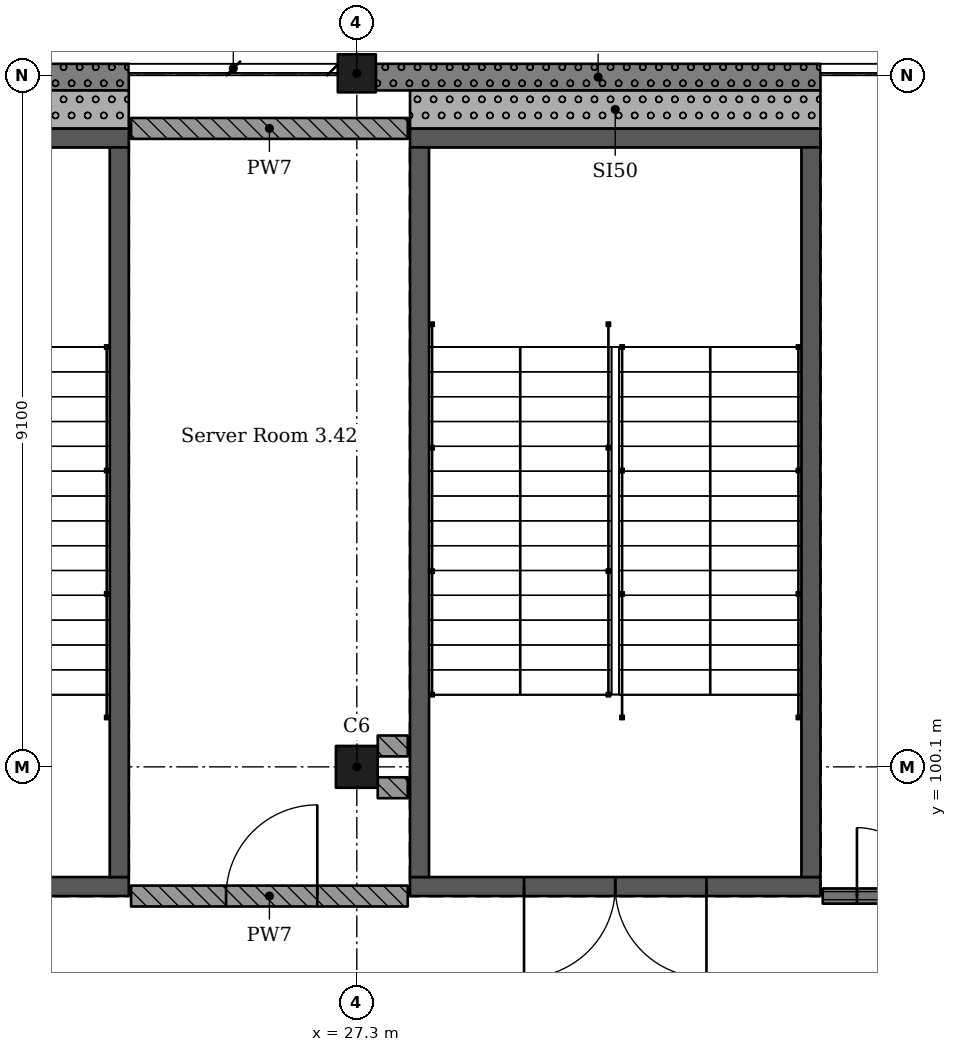
"""IFC4 building model, lengths in metres.
Left out: names, types, materials, properties, quantities, classifications, styles, units other than length and angle.
Written with IfcOpenShell. Run it as: python <this file> out.ifc"""

import sys

from ifc_helpers import new_model, si_unit, direction, frame, frame_2d, origin, origin_2d, place, context, subcontext, project, spatial, rectangle, extrude, element, fill, save


model = new_model("IFC4")
c1 = context("Model", 3, precision=1e-05, world=origin(), true_north=direction((0.0, 1.0)))
c2 = subcontext(c1, "Body", "Model", "MODEL_VIEW")
j1 = project(units=[si_unit("LENGTHUNIT", "METRE"), si_unit("PLANEANGLEUNIT", "RADIAN")], contexts=[c1])
p1 = place(None, origin())
s1 = spatial("IfcSite", under=j1, at=p1, CompositionType="ELEMENT")
p2 = place(p1, origin())
s2 = spatial("IfcBuilding", under=s1, at=p2, CompositionType="ELEMENT")
p3 = place(p2, frame((0.0, 0.0, 15.47)))
s3 = spatial("IfcBuildingStorey", under=s2, at=p3, CompositionType="ELEMENT", Elevation=15.47)
p4 = place(p3, frame((27.3, 100.1, 0.0), z_axis=(0.0, 0.0, 1.0), x_axis=(1.0, 0.0, 0.0)))
e1 = element("IfcColumn", 1, at=p4, inside=s3, PredefinedType="COLUMN", context=c2, shape_type="SweptSolid", body=[
    extrude(rectangle(XDim=0.55, YDim=0.55, at=origin_2d()), origin(), (0.0, 0.0, 1.0), 4.55),
])
p5 = place(p3, frame((27.3, 109.225, 0.0), z_axis=(0.0, 0.0, 1.0), x_axis=(1.0, 0.0, 0.0)))
e2 = element("IfcColumn", 2, at=p5, inside=s3, PredefinedType="COLUMN", context=c2, shape_type="SweptSolid", body=[
    extrude(rectangle(XDim=0.5, YDim=0.5, at=origin_2d()), origin(), (0.0, 0.0, 1.0), 4.55),
])
p6 = place(p3, frame((24.3, 98.525, 0.0), z_axis=(0.0, 0.0, 1.0), x_axis=(-1.0, 0.0, 0.0)))
e3 = element("IfcWall", 3, at=p6, inside=s3, PredefinedType="SHEAR", context=c2, shape_type="SweptSolid", body=[
    extrude(rectangle(XDim=5.4, YDim=0.25, at=frame_2d((2.7, 0.0))), origin(), (0.0, 0.0, 1.0), 4.55),
])
p7 = place(p6, frame((1.5, 0.0, 0.0)))
e4 = element("IfcOpeningElement", 4, at=p7, cuts=e3, PredefinedType="OPENING", context=c2, shape_type="SweptSolid", body=[
    extrude(rectangle(XDim=2.4, YDim=2.1, at=frame_2d((1.2, 1.05))), frame((0.0, 0.135, 0.0), z_axis=(0.0, -1.0, 0.0), x_axis=(1.0, 0.0, 0.0)), (0.0, 0.0, 1.0), 0.27),
])
p8 = place(p3, frame((24.3, 108.375, 0.0), z_axis=(0.0, 0.0, 1.0), x_axis=(-1.0, 0.0, 0.0)))
e5 = element("IfcWall", 5, at=p8, inside=s3, PredefinedType="SHEAR", context=c2, shape_type="SweptSolid", body=[
    extrude(rectangle(XDim=5.4, YDim=0.25, at=frame_2d((2.7, 0.0))), origin(), (0.0, 0.0, 1.0), 4.55),
])
p9 = place(p3, frame((24.175, 108.25, 0.0), z_axis=(0.0, 0.0, 1.0), x_axis=(0.0, -1.0, 0.0)))
e6 = element("IfcWall", 6, at=p9, inside=s3, PredefinedType="SHEAR", context=c2, shape_type="SweptSolid", body=[
    extrude(rectangle(XDim=9.6, YDim=0.25, at=frame_2d((4.8, 0.0))), origin(), (0.0, 0.0, 1.0), 4.55),
])
p10 = place(p3, frame((33.4, 98.525, 0.0), z_axis=(0.0, 0.0, 1.0), x_axis=(-1.0, 0.0, 0.0)))
e7 = element("IfcWall", 7, at=p10, inside=s3, PredefinedType="SHEAR", context=c2, shape_type="SweptSolid", body=[
    extrude(rectangle(XDim=5.4, YDim=0.25, at=frame_2d((2.7, 0.0))), origin(), (0.0, 0.0, 1.0), 4.55),
])
p11 = place(p10, frame((1.5, 0.0, 0.0)))
e8 = element("IfcOpeningElement", 8, at=p11, cuts=e7, PredefinedType="OPENING", context=c2, shape_type="SweptSolid", body=[
    extrude(rectangle(XDim=2.4, YDim=2.1, at=frame_2d((1.2, 1.05))), frame((0.0, 0.135, 0.0), z_axis=(0.0, -1.0, 0.0), x_axis=(1.0, 0.0, 0.0)), (0.0, 0.0, 1.0), 0.27),
])
p12 = place(p3, frame((33.4, 108.375, 0.0), z_axis=(0.0, 0.0, 1.0), x_axis=(-1.0, 0.0, 0.0)))
e9 = element("IfcWall", 9, at=p12, inside=s3, PredefinedType="SHEAR", context=c2, shape_type="SweptSolid", body=[
    extrude(rectangle(XDim=5.4, YDim=0.25, at=frame_2d((2.7, 0.0))), origin(), (0.0, 0.0, 1.0), 4.55),
])
for number, where, z_axis, x_axis in (
    (10, (28.125, 108.25, 0.0), (0.0, 0.0, 1.0), (0.0, -1.0, 0.0)),
    (11, (33.275, 108.25, 0.0), (0.0, 0.0, 1.0), (0.0, -1.0, 0.0)),
):
    element("IfcWall", number, at=place(p3, frame(where, z_axis=z_axis, x_axis=x_axis)), inside=s3, PredefinedType="SHEAR", context=c2, shape_type="SweptSolid", body=[
        extrude(rectangle(XDim=9.6, YDim=0.25, at=frame_2d((4.8, 0.0))), origin(), (0.0, 0.0, 1.0), 4.55),
    ])
p13 = place(p3, frame((33.4, 109.175, 0.0), z_axis=(0.0, 0.0, 1.0), x_axis=(-1.0, 0.0, 0.0)))
e12 = element("IfcWall", 12, at=p13, inside=s3, PredefinedType="SOLIDWALL", context=c2, shape_type="SweptSolid", body=[
    extrude(rectangle(XDim=5.85, YDim=0.35, at=frame_2d((2.925, 0.0))), origin(), (0.0, 0.0, 1.0), 3.55),
])
p14 = place(p3, frame((24.3, 109.175, 0.0), z_axis=(0.0, 0.0, 1.0), x_axis=(-1.0, 0.0, 0.0)))
e13 = element("IfcWall", 13, at=p14, inside=s3, PredefinedType="SOLIDWALL", context=c2, shape_type="SweptSolid", body=[
    extrude(rectangle(XDim=5.85, YDim=0.35, at=frame_2d((2.925, 0.0))), origin(), (0.0, 0.0, 1.0), 3.55),
])
p15 = place(p3, frame((18.9, 108.75, 0.0), z_axis=(0.0, 0.0, 1.0), x_axis=(1.0, 0.0, 0.0)))
e14 = element("IfcWall", 14, at=p15, inside=s3, PredefinedType="SOLIDWALL", context=c2, shape_type="SweptSolid", body=[
    extrude(rectangle(XDim=5.4, YDim=0.5, at=frame_2d((2.7, 0.0))), origin(), (0.0, 0.0, 1.0), 4.3),
])
p16 = place(p3, frame((28.0, 108.75, 0.0), z_axis=(0.0, 0.0, 1.0), x_axis=(1.0, 0.0, 0.0)))
e15 = element("IfcWall", 15, at=p16, inside=s3, PredefinedType="SOLIDWALL", context=c2, shape_type="SweptSolid", body=[
    extrude(rectangle(XDim=5.4, YDim=0.5, at=frame_2d((2.7, 0.0))), origin(), (0.0, 0.0, 1.0), 4.3),
])
p17 = place(p3, frame((24.33, 98.4, 0.0), z_axis=(0.0, 0.0, 1.0), x_axis=(1.0, 0.0, 0.0)))
e16 = element("IfcWall", 16, at=p17, inside=s3, PredefinedType="SOLIDWALL", context=c2, shape_type="SweptSolid", body=[
    extrude(rectangle(XDim=3.64, YDim=0.275, at=frame_2d((1.82, 0.0))), origin(), (0.0, 0.0, 1.0), 4.3),
])
p18 = place(p17, frame((1.25, 0.0, 0.0)))
e17 = element("IfcOpeningElement", 17, at=p18, cuts=e16, PredefinedType="OPENING", context=c2, shape_type="SweptSolid", body=[
    extrude(rectangle(XDim=1.2, YDim=2.4, at=frame_2d((0.6, 1.2))), frame((0.0, 0.147, 0.0), z_axis=(0.0, -1.0, 0.0), x_axis=(1.0, 0.0, 0.0)), (0.0, 0.0, 1.0), 0.295),
])
p19 = place(p3, frame((24.33, 108.5, 0.0), z_axis=(0.0, 0.0, 1.0), x_axis=(1.0, 0.0, 0.0)))
e18 = element("IfcWall", 18, at=p19, inside=s3, PredefinedType="SOLIDWALL", context=c2, shape_type="SweptSolid", body=[
    extrude(rectangle(XDim=3.64, YDim=0.275, at=frame_2d((1.82, 0.0))), origin(), (0.0, 0.0, 1.0), 4.3),
])
for number, where, z_axis, x_axis in (
    (19, (27.575, 99.825, 0.0), (0.0, 0.0, 1.0), (1.0, 0.0, 0.0)),
    (20, (27.97, 100.375, 0.0), (0.0, 0.0, 1.0), (-1.0, 0.0, 0.0)),
):
    element("IfcWall", number, at=place(p3, frame(where, z_axis=z_axis, x_axis=x_axis)), inside=s3, PredefinedType="SOLIDWALL", context=c2, shape_type="SweptSolid", body=[
        extrude(rectangle(XDim=0.395, YDim=0.275, at=frame_2d((0.198, 0.0))), origin(), (0.0, 0.0, 1.0), 4.3),
    ])
p20 = place(p3, frame((33.43, 98.4, 0.0), z_axis=(0.0, 0.0, 1.0), x_axis=(1.0, 0.0, 0.0)))
e21 = element("IfcWall", 21, at=p20, inside=s3, PredefinedType="PARTITIONING", context=c2, shape_type="SweptSolid", body=[
    extrude(rectangle(XDim=2.745, YDim=0.2, at=frame_2d((1.373, 0.0))), origin(), (0.0, 0.0, 1.0), 4.3),
])
p21 = place(p20, frame((0.45, 0.0, 0.0)))
e22 = element("IfcOpeningElement", 22, at=p21, cuts=e21, PredefinedType="OPENING", context=c2, shape_type="SweptSolid", body=[
    extrude(rectangle(XDim=1.8, YDim=2.4, at=frame_2d((0.9, 1.2))), frame((0.0, 0.11, 0.0), z_axis=(0.0, -1.0, 0.0), x_axis=(1.0, 0.0, 0.0)), (0.0, 0.0, 1.0), 0.22),
])
p22 = place(p18, origin())
e23 = element("IfcDoor", 23, at=p22, inside=s3, OperationType="SINGLE_SWING_LEFT", PredefinedType="DOOR", context=c2, shape_type="SweptSolid", body=[
    extrude(rectangle(XDim=1.2, YDim=2.4, at=frame_2d((0.6, 1.2))), frame((0.0, 0.025, 0.0), z_axis=(0.0, -1.0, 0.0), x_axis=(1.0, 0.0, 0.0)), (0.0, 0.0, 1.0), 0.05),
])
fill(e17, e23)
p23 = place(p21, origin())
e24 = element("IfcDoor", 24, at=p23, inside=s3, OperationType="DOUBLE_DOOR_SINGLE_SWING", PredefinedType="DOOR", context=c2, shape_type="SweptSolid", body=[
    extrude(rectangle(XDim=1.8, YDim=2.4, at=frame_2d((0.9, 1.2))), frame((0.0, 0.025, 0.0), z_axis=(0.0, -1.0, 0.0), x_axis=(1.0, 0.0, 0.0)), (0.0, 0.0, 1.0), 0.05),
])
fill(e22, e24)
p24 = place(p11, origin())
e25 = element("IfcDoor", 25, at=p24, inside=s3, OperationType="DOUBLE_DOOR_SINGLE_SWING", PredefinedType="DOOR", context=c2, shape_type="SweptSolid", body=[
    extrude(rectangle(XDim=2.4, YDim=2.1, at=frame_2d((1.2, 1.05))), frame((0.0, 0.025, 0.0), z_axis=(0.0, -1.0, 0.0), x_axis=(1.0, 0.0, 0.0)), (0.0, 0.0, 1.0), 0.05),
])
fill(e8, e25)
save(model, sys.argv[1])
